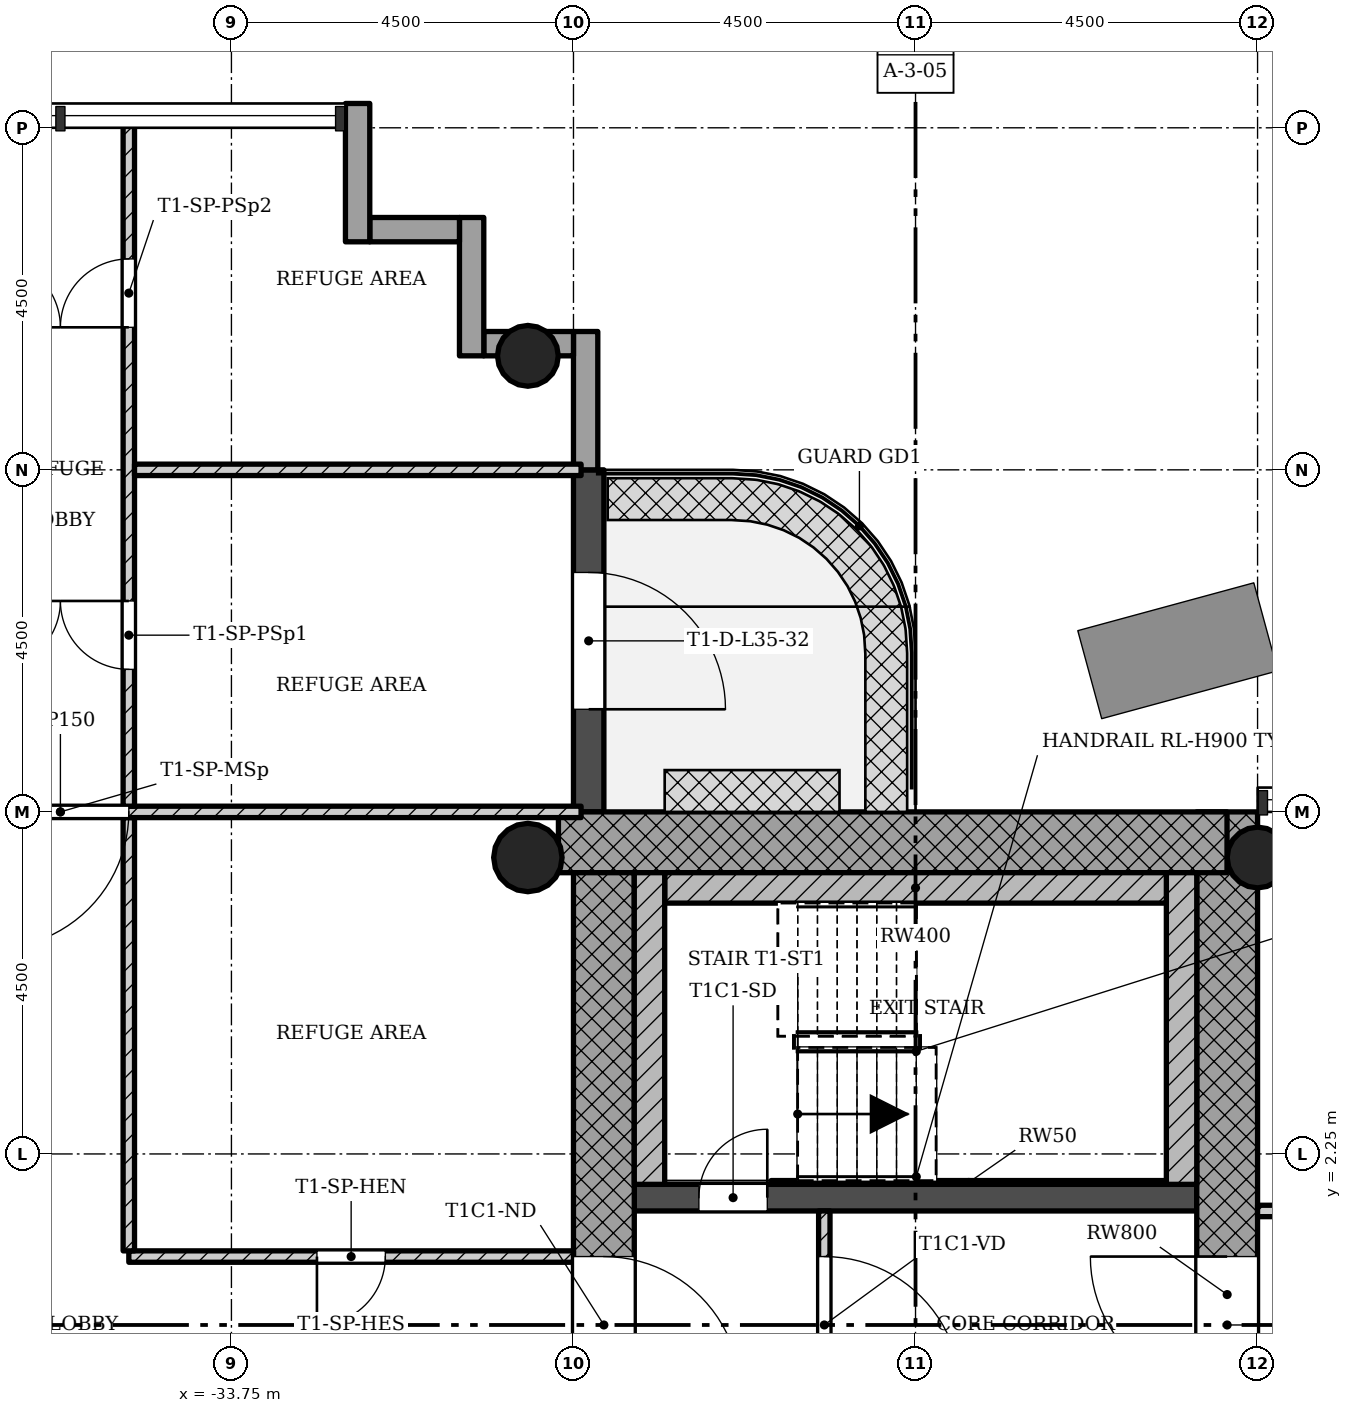
"""IFC4 building model, lengths in metres.
Left out: names, types, materials, properties, quantities, classifications, styles, units other than length and angle.
Written with IfcOpenShell. Run it as: python <this file> out.ifc"""

import sys

from ifc_helpers import new_model, si_unit, direction, frame, frame_2d, origin, origin_2d, place, context, subcontext, project, spatial, rectangle, hollow_circle, extrude, element, fill, save


model = new_model("IFC4")
c1 = context("Model", 3, precision=1e-05, world=origin(), true_north=direction((0.0, 1.0)))
c2 = subcontext(c1, "Body", "Model", "MODEL_VIEW")
j1 = project(units=[si_unit("LENGTHUNIT", "METRE"), si_unit("PLANEANGLEUNIT", "RADIAN")], contexts=[c1])
p1 = place(None, origin())
s1 = spatial("IfcSite", under=j1, at=p1, CompositionType="ELEMENT")
p2 = place(p1, origin())
s2 = spatial("IfcBuilding", under=s1, at=p2, CompositionType="ELEMENT")
p3 = place(p2, frame((0.0, 0.0, 128.7)))
s3 = spatial("IfcBuildingStorey", under=s2, at=p3, CompositionType="ELEMENT", Elevation=128.7)
p4 = place(p3, frame((-20.65, -5.95, 0.0), z_axis=(0.0, 0.0, 1.0), x_axis=(0.0, 1.0, 0.0)))
e1 = element("IfcWall", 1, at=p4, inside=s3, PredefinedType="SHEAR", context=c2, shape_type="SweptSolid", body=[
    extrude(rectangle(XDim=12.7, YDim=0.8, at=frame_2d((6.35, 0.0))), origin(), (0.0, 0.0, 1.0), 5.0),
])
p5 = place(p4, frame((5.05, 0.0, 0.0)))
e2 = element("IfcOpeningElement", 2, at=p5, cuts=e1, PredefinedType="OPENING", context=c2, shape_type="SweptSolid", body=[
    extrude(rectangle(XDim=1.8, YDim=2.1, at=frame_2d((0.9, 1.05))), frame((0.0, 0.41, 0.0), z_axis=(0.0, -1.0, 0.0), x_axis=(1.0, 0.0, 0.0)), (0.0, 0.0, 1.0), 0.82),
])
p6 = place(p3, frame((-20.652, 6.35, 0.0), z_axis=(0.0, 0.0, 1.0), x_axis=(-1.0, 0.0, 0.0)))
e3 = element("IfcWall", 3, at=p6, inside=s3, PredefinedType="SHEAR", context=c2, shape_type="SweptSolid", body=[
    extrude(rectangle(XDim=8.796, YDim=0.8, at=frame_2d((4.398, 0.0))), origin(), (0.0, 0.0, 1.0), 5.0),
])
p7 = place(p3, frame((-28.85, 5.95, 0.0), z_axis=(0.0, 0.0, 1.0), x_axis=(0.0, -1.0, 0.0)))
e4 = element("IfcWall", 4, at=p7, inside=s3, PredefinedType="SHEAR", context=c2, shape_type="SweptSolid", body=[
    extrude(rectangle(XDim=12.7, YDim=0.8, at=frame_2d((6.35, 0.0))), origin(), (0.0, 0.0, 1.0), 5.0),
])
p8 = place(p7, frame((5.05, 0.0, 0.0)))
e5 = element("IfcOpeningElement", 5, at=p8, cuts=e4, PredefinedType="OPENING", context=c2, shape_type="SweptSolid", body=[
    extrude(rectangle(XDim=1.8, YDim=2.1, at=frame_2d((0.9, 1.05))), frame((0.0, 0.41, 0.0), z_axis=(0.0, -1.0, 0.0), x_axis=(1.0, 0.0, 0.0)), (0.0, 0.0, 1.0), 0.82),
])
p9 = place(p3, frame((-28.45, 1.675, 0.0), z_axis=(0.0, 0.0, 1.0), x_axis=(1.0, 0.0, 0.0)))
e6 = element("IfcWall", 6, at=p9, inside=s3, PredefinedType="SHEAR", context=c2, shape_type="SweptSolid", body=[
    extrude(rectangle(XDim=7.4, YDim=0.35, at=frame_2d((3.7, 0.0))), origin(), (0.0, 0.0, 1.0), 5.0),
])
p10 = place(p9, frame((0.85, 0.0, 0.0)))
e7 = element("IfcOpeningElement", 7, at=p10, cuts=e6, PredefinedType="OPENING", context=c2, shape_type="SweptSolid", body=[
    extrude(rectangle(XDim=0.9, YDim=2.1, at=frame_2d((0.45, 1.05))), frame((0.0, 0.185, 0.0), z_axis=(0.0, -1.0, 0.0), x_axis=(1.0, 0.0, 0.0)), (0.0, 0.0, 1.0), 0.37),
])
for number, where, z_axis, x_axis in (
    (8, (-20.25, 6.15, 0.0), (0.0, 0.0, 1.0), (1.0, 0.0, 0.0)),
    (9, (-29.85, 12.75, 0.0), (0.0, 0.0, 1.0), (1.0, 0.0, 0.0)),
):
    element("IfcColumn", number, at=place(p3, frame(where, z_axis=z_axis, x_axis=x_axis)), inside=s3, PredefinedType="COLUMN", context=c2, shape_type="SweptSolid", body=[
        extrude(hollow_circle(Radius=0.4, WallThickness=0.028, at=origin_2d()), origin(), (0.0, 0.0, 1.0), 5.0),
    ])
p11 = place(p3, frame((-29.85, 6.15, 0.0), z_axis=(0.0, 0.0, 1.0), x_axis=(1.0, 0.0, 0.0)))
e10 = element("IfcColumn", 10, at=p11, inside=s3, PredefinedType="COLUMN", context=c2, shape_type="SweptSolid", body=[
    extrude(hollow_circle(Radius=0.45, WallThickness=0.032, at=origin_2d()), origin(), (0.0, 0.0, 1.0), 5.0),
])
p12 = place(p3, frame((-29.05, 6.75, -0.02), z_axis=(0.0, 0.0, 1.0), x_axis=(0.0, 1.0, 0.0)))
e11 = element("IfcWall", 11, at=p12, inside=s3, PredefinedType="STANDARD", context=c2, shape_type="SweptSolid", body=[
    extrude(rectangle(XDim=4.5, YDim=0.4, at=frame_2d((2.25, 0.0))), origin(), (0.0, 0.0, 1.0), 4.72),
])
p13 = place(p12, frame((1.35, 0.0, 0.02)))
e12 = element("IfcOpeningElement", 12, at=p13, cuts=e11, PredefinedType="OPENING", context=c2, shape_type="SweptSolid", body=[
    extrude(rectangle(XDim=1.8, YDim=2.1, at=frame_2d((0.9, 1.05))), frame((0.0, 0.21, 0.0), z_axis=(0.0, -1.0, 0.0), x_axis=(1.0, 0.0, 0.0)), (0.0, 0.0, 1.0), 0.42),
])
p14 = place(p3, frame((-29.09, 11.25, -0.3), z_axis=(0.0, 0.0, 1.0), x_axis=(0.0, 1.0, 0.0)))
e13 = element("IfcWall", 13, at=p14, inside=s3, PredefinedType="STANDARD", context=c2, shape_type="SweptSolid", body=[
    extrude(rectangle(XDim=1.82, YDim=0.32, at=frame_2d((0.91, 0.0))), origin(), (0.0, 0.0, 1.0), 5.0),
])
p15 = place(p3, frame((-29.25, 12.91, -0.3), z_axis=(0.0, 0.0, 1.0), x_axis=(-1.0, 0.0, 0.0)))
e14 = element("IfcWall", 14, at=p15, inside=s3, PredefinedType="STANDARD", context=c2, shape_type="SweptSolid", body=[
    extrude(rectangle(XDim=1.18, YDim=0.32, at=frame_2d((0.59, 0.0))), origin(), (0.0, 0.0, 1.0), 5.0),
])
p16 = place(p3, frame((-30.59, 12.75, -0.3), z_axis=(0.0, 0.0, 1.0), x_axis=(0.0, 1.0, 0.0)))
e15 = element("IfcWall", 15, at=p16, inside=s3, PredefinedType="STANDARD", context=c2, shape_type="SweptSolid", body=[
    extrude(rectangle(XDim=1.82, YDim=0.32, at=frame_2d((0.91, 0.0))), origin(), (0.0, 0.0, 1.0), 5.0),
])
p17 = place(p3, frame((-30.75, 14.41, -0.3), z_axis=(0.0, 0.0, 1.0), x_axis=(-1.0, 0.0, 0.0)))
e16 = element("IfcWall", 16, at=p17, inside=s3, PredefinedType="STANDARD", context=c2, shape_type="SweptSolid", body=[
    extrude(rectangle(XDim=1.18, YDim=0.32, at=frame_2d((0.59, 0.0))), origin(), (0.0, 0.0, 1.0), 5.0),
])
p18 = place(p3, frame((-32.09, 14.25, -0.3), z_axis=(0.0, 0.0, 1.0), x_axis=(0.0, 1.0, 0.0)))
e17 = element("IfcWall", 17, at=p18, inside=s3, PredefinedType="STANDARD", context=c2, shape_type="SweptSolid", body=[
    extrude(rectangle(XDim=1.82, YDim=0.32, at=frame_2d((0.91, 0.0))), origin(), (0.0, 0.0, 1.0), 5.0),
])
p19 = place(p3, frame((-25.95, -1.5, 0.0), z_axis=(0.0, 0.0, 1.0), x_axis=(0.0, 1.0, 0.0)))
e18 = element("IfcWall", 18, at=p19, inside=s3, PredefinedType="PARTITIONING", context=c2, shape_type="SweptSolid", body=[
    extrude(rectangle(XDim=3.0, YDim=0.15, at=frame_2d((1.5, 0.0))), origin(), (0.0, 0.0, 1.0), 4.58),
])
p20 = place(p19, frame((0.6, 0.0, 0.0)))
e19 = element("IfcOpeningElement", 19, at=p20, cuts=e18, PredefinedType="OPENING", context=c2, shape_type="SweptSolid", body=[
    extrude(rectangle(XDim=1.8, YDim=2.1, at=frame_2d((0.9, 1.05))), frame((0.0, 0.085, 0.0), z_axis=(0.0, -1.0, 0.0), x_axis=(1.0, 0.0, 0.0)), (0.0, 0.0, 1.0), 0.17),
])
p21 = place(p3, frame((-35.1, 0.9, 0.0), z_axis=(0.0, 0.0, 1.0), x_axis=(1.0, 0.0, 0.0)))
e20 = element("IfcWall", 20, at=p21, inside=s3, PredefinedType="PARTITIONING", context=c2, shape_type="SweptSolid", body=[
    extrude(rectangle(XDim=5.85, YDim=0.15, at=frame_2d((2.925, 0.0))), origin(), (0.0, 0.0, 1.0), 4.58),
])
p22 = place(p21, frame((2.475, 0.0, 0.0)))
e21 = element("IfcOpeningElement", 21, at=p22, cuts=e20, PredefinedType="OPENING", context=c2, shape_type="SweptSolid", body=[
    extrude(rectangle(XDim=0.9, YDim=2.1, at=frame_2d((0.45, 1.05))), frame((0.0, 0.085, 0.0), z_axis=(0.0, -1.0, 0.0), x_axis=(1.0, 0.0, 0.0)), (0.0, 0.0, 1.0), 0.17),
])
p23 = place(p3, frame((-35.1, 0.975, 0.0), z_axis=(0.0, 0.0, 1.0), x_axis=(0.0, 1.0, 0.0)))
e22 = element("IfcWall", 22, at=p23, inside=s3, PredefinedType="PARTITIONING", context=c2, shape_type="SweptSolid", body=[
    extrude(rectangle(XDim=5.7, YDim=0.15, at=frame_2d((2.85, 0.0))), origin(), (0.0, 0.0, 1.0), 4.58),
])
p24 = place(p3, frame((-20.25, 1.5, 0.0), z_axis=(0.0, 0.0, 1.0), x_axis=(1.0, 0.0, 0.0)))
e23 = element("IfcWall", 23, at=p24, inside=s3, PredefinedType="PARTITIONING", context=c2, shape_type="SweptSolid", body=[
    extrude(rectangle(XDim=9.1, YDim=0.15, at=frame_2d((4.55, 0.0))), origin(), (0.0, 0.0, 1.0), 4.58),
])
p25 = place(p24, frame((1.8, 0.0, 0.0)))
e24 = element("IfcOpeningElement", 24, at=p25, cuts=e23, PredefinedType="OPENING", context=c2, shape_type="SweptSolid", body=[
    extrude(rectangle(XDim=0.9, YDim=2.1, at=frame_2d((0.45, 1.05))), frame((0.0, 0.085, 0.0), z_axis=(0.0, -1.0, 0.0), x_axis=(1.0, 0.0, 0.0)), (0.0, 0.0, 1.0), 0.17),
])
p26 = place(p24, frame((6.3, 0.0, 0.0)))
e25 = element("IfcOpeningElement", 25, at=p26, cuts=e23, PredefinedType="OPENING", context=c2, shape_type="SweptSolid", body=[
    extrude(rectangle(XDim=0.9, YDim=2.1, at=frame_2d((0.45, 1.05))), frame((0.0, 0.085, 0.0), z_axis=(0.0, -1.0, 0.0), x_axis=(1.0, 0.0, 0.0)), (0.0, 0.0, 1.0), 0.17),
])
p27 = place(p3, frame((-42.85, 6.75, 0.0), z_axis=(0.0, 0.0, 1.0), x_axis=(1.0, 0.0, 0.0)))
e26 = element("IfcWall", 26, at=p27, inside=s3, PredefinedType="PARTITIONING", context=c2, shape_type="SweptSolid", body=[
    extrude(rectangle(XDim=13.7, YDim=0.15, at=frame_2d((6.85, 0.0))), origin(), (0.0, 0.0, 1.0), 4.58),
])
p28 = place(p27, frame((5.95, 0.0, 0.0)))
e27 = element("IfcOpeningElement", 27, at=p28, cuts=e26, PredefinedType="OPENING", context=c2, shape_type="SweptSolid", body=[
    extrude(rectangle(XDim=1.8, YDim=2.1, at=frame_2d((0.9, 1.05))), frame((0.0, 0.085, 0.0), z_axis=(0.0, -1.0, 0.0), x_axis=(1.0, 0.0, 0.0)), (0.0, 0.0, 1.0), 0.17),
])
p29 = place(p3, frame((-35.1, 6.825, 0.0), z_axis=(0.0, 0.0, 1.0), x_axis=(0.0, 1.0, 0.0)))
e28 = element("IfcWall", 28, at=p29, inside=s3, PredefinedType="PARTITIONING", context=c2, shape_type="SweptSolid", body=[
    extrude(rectangle(XDim=9.025, YDim=0.15, at=frame_2d((4.513, 0.0))), origin(), (0.0, 0.0, 1.0), 4.58),
])
p30 = place(p29, frame((1.8, 0.0, 0.0)))
e29 = element("IfcOpeningElement", 29, at=p30, cuts=e28, PredefinedType="OPENING", context=c2, shape_type="SweptSolid", body=[
    extrude(rectangle(XDim=0.9, YDim=2.1, at=frame_2d((0.45, 1.05))), frame((0.0, 0.085, 0.0), z_axis=(0.0, -1.0, 0.0), x_axis=(1.0, 0.0, 0.0)), (0.0, 0.0, 1.0), 0.17),
])
p31 = place(p29, frame((6.3, 0.0, 0.0)))
e30 = element("IfcOpeningElement", 30, at=p31, cuts=e28, PredefinedType="OPENING", context=c2, shape_type="SweptSolid", body=[
    extrude(rectangle(XDim=0.9, YDim=2.1, at=frame_2d((0.45, 1.05))), frame((0.0, 0.085, 0.0), z_axis=(0.0, -1.0, 0.0), x_axis=(1.0, 0.0, 0.0)), (0.0, 0.0, 1.0), 0.17),
])
p32 = place(p3, frame((-35.025, 11.25, 0.0), z_axis=(0.0, 0.0, 1.0), x_axis=(1.0, 0.0, 0.0)))
e31 = element("IfcWall", 31, at=p32, inside=s3, PredefinedType="PARTITIONING", context=c2, shape_type="SweptSolid", body=[
    extrude(rectangle(XDim=5.875, YDim=0.15, at=frame_2d((2.938, 0.0))), origin(), (0.0, 0.0, 1.0), 4.58),
])
p33 = place(p3, frame((-21.25, 1.85, 0.0), z_axis=(0.0, 0.0, 1.0), x_axis=(0.0, 1.0, 0.0)))
e32 = element("IfcWall", 32, at=p33, inside=s3, PredefinedType="SHEAR", context=c2, shape_type="SweptSolid", body=[
    extrude(rectangle(XDim=4.1, YDim=0.4, at=frame_2d((2.05, 0.0))), origin(), (0.0, 0.0, 1.0), 5.0),
])
p34 = place(p3, frame((-28.05, 5.75, 0.0), z_axis=(0.0, 0.0, 1.0), x_axis=(1.0, 0.0, 0.0)))
e33 = element("IfcWall", 33, at=p34, inside=s3, PredefinedType="SHEAR", context=c2, shape_type="SweptSolid", body=[
    extrude(rectangle(XDim=6.6, YDim=0.4, at=frame_2d((3.3, 0.0))), origin(), (0.0, 0.0, 1.0), 5.0),
])
p35 = place(p3, frame((-28.25, 1.85, 0.0), z_axis=(0.0, 0.0, 1.0), x_axis=(0.0, 1.0, 0.0)))
e34 = element("IfcWall", 34, at=p35, inside=s3, PredefinedType="SHEAR", context=c2, shape_type="SweptSolid", body=[
    extrude(rectangle(XDim=4.1, YDim=0.4, at=frame_2d((2.05, 0.0))), origin(), (0.0, 0.0, 1.0), 5.0),
])
p36 = place(p3, frame((-26.65, 1.875, 0.0), z_axis=(0.0, 0.0, 1.0), x_axis=(1.0, 0.0, 0.0)))
e35 = element("IfcWall", 35, at=p36, inside=s3, PredefinedType="SHEAR", context=c2, shape_type="SweptSolid", body=[
    extrude(rectangle(XDim=5.2, YDim=0.05, at=frame_2d((2.6, 0.0))), origin(), (0.0, 0.0, 1.0), 5.0),
])
p37 = place(p13, origin())
e36 = element("IfcDoor", 36, at=p37, inside=s3, OperationType="SINGLE_SWING_LEFT", PredefinedType="DOOR", context=c2, shape_type="SweptSolid", body=[
    extrude(rectangle(XDim=1.8, YDim=2.1, at=frame_2d((0.9, 1.05))), frame((0.0, 0.025, 0.0), z_axis=(0.0, -1.0, 0.0), x_axis=(1.0, 0.0, 0.0)), (0.0, 0.0, 1.0), 0.05),
])
fill(e12, e36)
p38 = place(p20, origin())
e37 = element("IfcDoor", 37, at=p38, inside=s3, OperationType="SINGLE_SWING_LEFT", PredefinedType="DOOR", context=c2, shape_type="SweptSolid", body=[
    extrude(rectangle(XDim=1.8, YDim=2.1, at=frame_2d((0.9, 1.05))), frame((0.0, 0.025, 0.0), z_axis=(0.0, -1.0, 0.0), x_axis=(1.0, 0.0, 0.0)), (0.0, 0.0, 1.0), 0.05),
])
fill(e19, e37)
p39 = place(p22, origin())
e38 = element("IfcDoor", 38, at=p39, inside=s3, OperationType="SINGLE_SWING_LEFT", PredefinedType="DOOR", context=c2, shape_type="SweptSolid", body=[
    extrude(rectangle(XDim=0.9, YDim=2.1, at=frame_2d((0.45, 1.05))), frame((0.0, 0.025, 0.0), z_axis=(0.0, -1.0, 0.0), x_axis=(1.0, 0.0, 0.0)), (0.0, 0.0, 1.0), 0.05),
])
fill(e21, e38)
p40 = place(p28, origin())
e39 = element("IfcDoor", 39, at=p40, inside=s3, OperationType="SINGLE_SWING_LEFT", PredefinedType="DOOR", context=c2, shape_type="SweptSolid", body=[
    extrude(rectangle(XDim=1.8, YDim=2.1, at=frame_2d((0.9, 1.05))), frame((0.0, 0.025, 0.0), z_axis=(0.0, -1.0, 0.0), x_axis=(1.0, 0.0, 0.0)), (0.0, 0.0, 1.0), 0.05),
])
fill(e27, e39)
p41 = place(p30, origin())
e40 = element("IfcDoor", 40, at=p41, inside=s3, OperationType="SINGLE_SWING_LEFT", PredefinedType="DOOR", context=c2, shape_type="SweptSolid", body=[
    extrude(rectangle(XDim=0.9, YDim=2.1, at=frame_2d((0.45, 1.05))), frame((0.0, 0.025, 0.0), z_axis=(0.0, -1.0, 0.0), x_axis=(1.0, 0.0, 0.0)), (0.0, 0.0, 1.0), 0.05),
])
fill(e29, e40)
p42 = place(p31, origin())
e41 = element("IfcDoor", 41, at=p42, inside=s3, OperationType="SINGLE_SWING_RIGHT", PredefinedType="DOOR", context=c2, shape_type="SweptSolid", body=[
    extrude(rectangle(XDim=0.9, YDim=2.1, at=frame_2d((0.45, 1.05))), frame((0.0, 0.025, 0.0), z_axis=(0.0, -1.0, 0.0), x_axis=(1.0, 0.0, 0.0)), (0.0, 0.0, 1.0), 0.05),
])
fill(e30, e41)
p43 = place(p10, origin())
e42 = element("IfcDoor", 42, at=p43, inside=s3, OperationType="SINGLE_SWING_LEFT", PredefinedType="DOOR", context=c2, shape_type="SweptSolid", body=[
    extrude(rectangle(XDim=0.9, YDim=2.1, at=frame_2d((0.45, 1.05))), frame((0.0, 0.025, 0.0), z_axis=(0.0, -1.0, 0.0), x_axis=(1.0, 0.0, 0.0)), (0.0, 0.0, 1.0), 0.05),
])
fill(e7, e42)
p44 = place(p8, origin())
e43 = element("IfcDoor", 43, at=p44, inside=s3, OperationType="SINGLE_SWING_LEFT", PredefinedType="DOOR", context=c2, shape_type="SweptSolid", body=[
    extrude(rectangle(XDim=1.8, YDim=2.1, at=frame_2d((0.9, 1.05))), frame((0.0, 0.025, 0.0), z_axis=(0.0, -1.0, 0.0), x_axis=(1.0, 0.0, 0.0)), (0.0, 0.0, 1.0), 0.05),
])
fill(e5, e43)
p45 = place(p5, origin())
e44 = element("IfcDoor", 44, at=p45, inside=s3, OperationType="SINGLE_SWING_LEFT", PredefinedType="DOOR", context=c2, shape_type="SweptSolid", body=[
    extrude(rectangle(XDim=1.8, YDim=2.1, at=frame_2d((0.9, 1.05))), frame((0.0, 0.025, 0.0), z_axis=(0.0, -1.0, 0.0), x_axis=(1.0, 0.0, 0.0)), (0.0, 0.0, 1.0), 0.05),
])
fill(e2, e44)
save(model, sys.argv[1])
